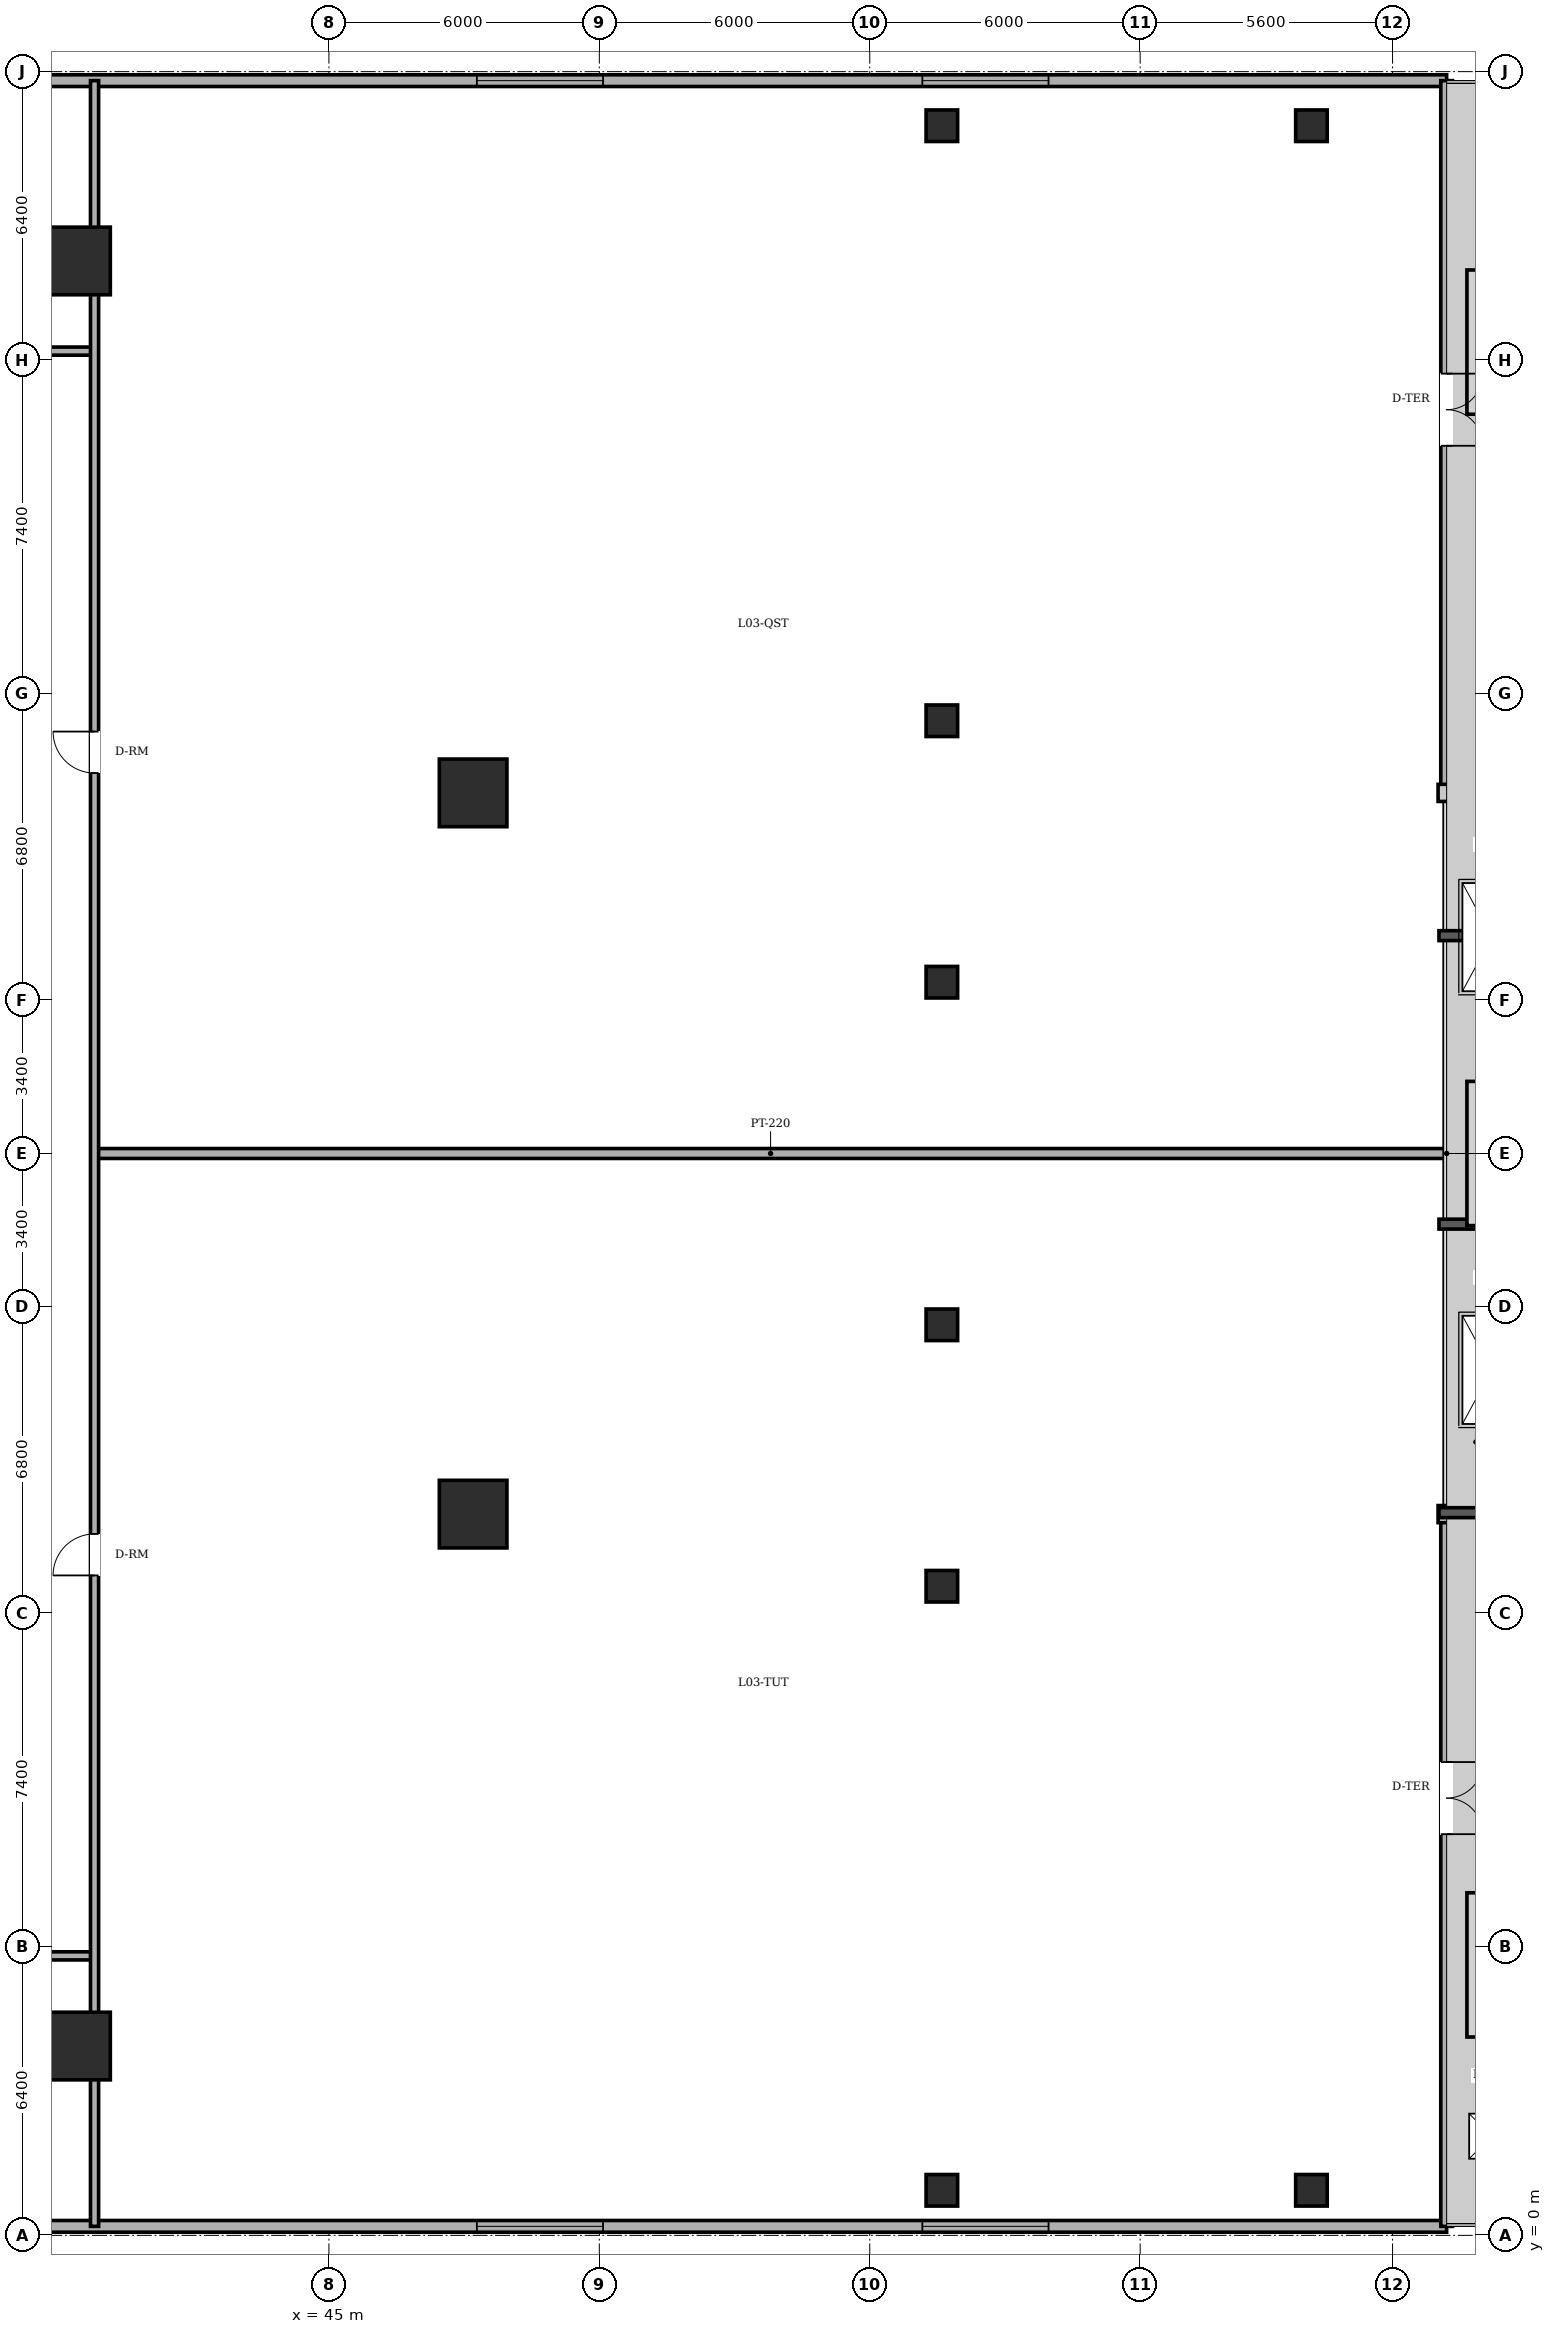
"""IFC4 building model, lengths in metres.
Left out: names, types, materials, properties, quantities, classifications, styles, units other than length and angle.
Written with IfcOpenShell. Run it as: python <this file> out.ifc"""

import sys

from ifc_helpers import new_model, si_unit, direction, frame, frame_2d, origin, origin_2d, place, context, subcontext, project, spatial, rectangle, circle, extrude, element, fill, save


model = new_model("IFC4")
c1 = context("Model", 3, precision=1e-05, world=origin(), true_north=direction((0.0, 1.0)))
c2 = subcontext(c1, "Body", "Model", "MODEL_VIEW")
j1 = project(units=[si_unit("LENGTHUNIT", "METRE"), si_unit("PLANEANGLEUNIT", "RADIAN")], contexts=[c1])
p1 = place(None, origin())
s1 = spatial("IfcSite", under=j1, at=p1, CompositionType="ELEMENT")
p2 = place(p1, origin())
s2 = spatial("IfcBuilding", under=s1, at=p2, CompositionType="ELEMENT")
p3 = place(p2, frame((0.0, 0.0, 10.05)))
s3 = spatial("IfcBuildingStorey", under=s2, at=p3, CompositionType="ELEMENT", Elevation=10.05)
for number, where, z_axis, x_axis in (
    (1, (39.4, 4.2, 0.0), (0.0, 0.0, 1.0), (1.0, 0.0, 0.0)),
    (2, (48.2, 16.0, 0.0), (0.0, 0.0, 1.0), (1.0, 0.0, 0.0)),
    (3, (48.2, 32.0, 0.0), (0.0, 0.0, 1.0), (1.0, 0.0, 0.0)),
    (4, (39.4, 43.8, 0.0), (0.0, 0.0, 1.0), (1.0, 0.0, 0.0)),
):
    element("IfcColumn", number, at=place(p3, frame(where, z_axis=z_axis, x_axis=x_axis)), inside=s3, PredefinedType="COLUMN", context=c2, shape_type="SweptSolid", body=[
        extrude(circle(Radius=0.75, at=origin_2d()), origin(), (0.0, 0.0, 1.0), 4.65),
    ])
for number, where, z_axis, x_axis in (
    (5, (58.6, 1.0, 0.0), (0.0, 0.0, 1.0), (1.0, 0.0, 0.0)),
    (6, (58.6, 46.8, 0.0), (0.0, 0.0, 1.0), (1.0, 0.0, 0.0)),
    (7, (58.6, 20.2, 0.0), (0.0, 0.0, 1.0), (1.0, 0.0, 0.0)),
    (8, (58.6, 27.8, 0.0), (0.0, 0.0, 1.0), (1.0, 0.0, 0.0)),
    (9, (58.6, 14.4, 0.0), (0.0, 0.0, 1.0), (1.0, 0.0, 0.0)),
    (10, (58.6, 33.6, 0.0), (0.0, 0.0, 1.0), (1.0, 0.0, 0.0)),
    (11, (66.8, 1.0, 0.0), (0.0, 0.0, 1.0), (1.0, 0.0, 0.0)),
    (12, (66.8, 46.8, 0.0), (0.0, 0.0, 1.0), (1.0, 0.0, 0.0)),
):
    element("IfcColumn", number, at=place(p3, frame(where, z_axis=z_axis, x_axis=x_axis)), inside=s3, PredefinedType="COLUMN", context=c2, shape_type="SweptSolid", body=[
        extrude(rectangle(XDim=0.7, YDim=0.7, at=origin_2d()), origin(), (0.0, 0.0, 1.0), 4.65),
    ])
p4 = place(p3, frame((69.8, 0.2, 0.0), z_axis=(0.0, 0.0, 1.0), x_axis=(-1.0, 0.0, 0.0)))
e13 = element("IfcWall", 13, at=p4, inside=s3, PredefinedType="SOLIDWALL", context=c2, shape_type="SweptSolid", body=[
    extrude(rectangle(XDim=68.2, YDim=0.26, at=frame_2d((34.1, 0.0))), origin(), (0.0, 0.0, 1.0), 4.43),
])
p5 = place(p4, frame((8.833, 0.0, 0.9)))
e14 = element("IfcOpeningElement", 14, at=p5, cuts=e13, PredefinedType="OPENING", context=c2, shape_type="SweptSolid", body=[
    extrude(rectangle(XDim=2.8, YDim=2.4, at=frame_2d((1.4, 1.2))), frame((0.0, 0.14, 0.0), z_axis=(0.0, -1.0, 0.0), x_axis=(1.0, 0.0, 0.0)), (0.0, 0.0, 1.0), 0.28),
])
p6 = place(p4, frame((18.717, 0.0, 0.9)))
e15 = element("IfcOpeningElement", 15, at=p6, cuts=e13, PredefinedType="OPENING", context=c2, shape_type="SweptSolid", body=[
    extrude(rectangle(XDim=2.8, YDim=2.4, at=frame_2d((1.4, 1.2))), frame((0.0, 0.14, 0.0), z_axis=(0.0, -1.0, 0.0), x_axis=(1.0, 0.0, 0.0)), (0.0, 0.0, 1.0), 0.28),
])
p7 = place(p4, frame((34.733, 0.0, 0.9)))
e16 = element("IfcOpeningElement", 16, at=p7, cuts=e13, PredefinedType="OPENING", context=c2, shape_type="SweptSolid", body=[
    extrude(rectangle(XDim=2.8, YDim=2.4, at=frame_2d((1.4, 1.2))), frame((0.0, 0.14, 0.0), z_axis=(0.0, -1.0, 0.0), x_axis=(1.0, 0.0, 0.0)), (0.0, 0.0, 1.0), 0.28),
])
p8 = place(p4, frame((40.867, 0.0, 0.9)))
e17 = element("IfcOpeningElement", 17, at=p8, cuts=e13, PredefinedType="OPENING", context=c2, shape_type="SweptSolid", body=[
    extrude(rectangle(XDim=2.8, YDim=2.4, at=frame_2d((1.4, 1.2))), frame((0.0, 0.14, 0.0), z_axis=(0.0, -1.0, 0.0), x_axis=(1.0, 0.0, 0.0)), (0.0, 0.0, 1.0), 0.28),
])
p9 = place(p4, frame((53.483, 0.0, 0.9)))
e18 = element("IfcOpeningElement", 18, at=p9, cuts=e13, PredefinedType="OPENING", context=c2, shape_type="SweptSolid", body=[
    extrude(rectangle(XDim=2.8, YDim=2.4, at=frame_2d((1.4, 1.2))), frame((0.0, 0.14, 0.0), z_axis=(0.0, -1.0, 0.0), x_axis=(1.0, 0.0, 0.0)), (0.0, 0.0, 1.0), 0.28),
])
p10 = place(p3, frame((1.6, 47.8, 0.0), z_axis=(0.0, 0.0, 1.0), x_axis=(1.0, 0.0, 0.0)))
e19 = element("IfcWall", 19, at=p10, inside=s3, PredefinedType="SOLIDWALL", context=c2, shape_type="SweptSolid", body=[
    extrude(rectangle(XDim=68.2, YDim=0.26, at=frame_2d((34.1, 0.0))), origin(), (0.0, 0.0, 1.0), 4.43),
])
p11 = place(p10, frame((11.567, 0.0, 0.9)))
e20 = element("IfcOpeningElement", 20, at=p11, cuts=e19, PredefinedType="OPENING", context=c2, shape_type="SweptSolid", body=[
    extrude(rectangle(XDim=2.8, YDim=2.4, at=frame_2d((1.4, 1.2))), frame((0.0, 0.14, 0.0), z_axis=(0.0, -1.0, 0.0), x_axis=(1.0, 0.0, 0.0)), (0.0, 0.0, 1.0), 0.28),
])
p12 = place(p10, frame((24.183, 0.0, 0.9)))
e21 = element("IfcOpeningElement", 21, at=p12, cuts=e19, PredefinedType="OPENING", context=c2, shape_type="SweptSolid", body=[
    extrude(rectangle(XDim=2.8, YDim=2.4, at=frame_2d((1.4, 1.2))), frame((0.0, 0.14, 0.0), z_axis=(0.0, -1.0, 0.0), x_axis=(1.0, 0.0, 0.0)), (0.0, 0.0, 1.0), 0.28),
])
p13 = place(p10, frame((46.683, 0.0, 0.9)))
e22 = element("IfcOpeningElement", 22, at=p13, cuts=e19, PredefinedType="OPENING", context=c2, shape_type="SweptSolid", body=[
    extrude(rectangle(XDim=2.8, YDim=2.4, at=frame_2d((1.4, 1.2))), frame((0.0, 0.14, 0.0), z_axis=(0.0, -1.0, 0.0), x_axis=(1.0, 0.0, 0.0)), (0.0, 0.0, 1.0), 0.28),
])
p14 = place(p10, frame((56.567, 0.0, 0.9)))
e23 = element("IfcOpeningElement", 23, at=p14, cuts=e19, PredefinedType="OPENING", context=c2, shape_type="SweptSolid", body=[
    extrude(rectangle(XDim=2.8, YDim=2.4, at=frame_2d((1.4, 1.2))), frame((0.0, 0.14, 0.0), z_axis=(0.0, -1.0, 0.0), x_axis=(1.0, 0.0, 0.0)), (0.0, 0.0, 1.0), 0.28),
])
p15 = place(p3, frame((69.8, 16.0, 0.0), z_axis=(0.0, 0.0, 1.0), x_axis=(0.0, -1.0, 0.0)))
e24 = element("IfcWall", 24, at=p15, inside=s3, PredefinedType="SOLIDWALL", context=c2, shape_type="SweptSolid", body=[
    extrude(rectangle(XDim=15.8, YDim=0.26, at=frame_2d((7.9, 0.0))), origin(), (0.0, 0.0, 1.0), 4.43),
])
p16 = place(p15, frame((5.5, 0.0, 0.0)))
e25 = element("IfcOpeningElement", 25, at=p16, cuts=e24, PredefinedType="OPENING", context=c2, shape_type="SweptSolid", body=[
    extrude(rectangle(XDim=1.6, YDim=2.3, at=frame_2d((0.8, 1.15))), frame((0.0, 0.14, 0.0), z_axis=(0.0, -1.0, 0.0), x_axis=(1.0, 0.0, 0.0)), (0.0, 0.0, 1.0), 0.28),
])
p17 = place(p3, frame((69.8, 47.8, 0.0), z_axis=(0.0, 0.0, 1.0), x_axis=(0.0, -1.0, 0.0)))
e26 = element("IfcWall", 26, at=p17, inside=s3, PredefinedType="SOLIDWALL", context=c2, shape_type="SweptSolid", body=[
    extrude(rectangle(XDim=15.8, YDim=0.26, at=frame_2d((7.9, 0.0))), origin(), (0.0, 0.0, 1.0), 4.43),
])
p18 = place(p17, frame((6.5, 0.0, 0.0)))
e27 = element("IfcOpeningElement", 27, at=p18, cuts=e26, PredefinedType="OPENING", context=c2, shape_type="SweptSolid", body=[
    extrude(rectangle(XDim=1.6, YDim=2.3, at=frame_2d((0.8, 1.15))), frame((0.0, 0.14, 0.0), z_axis=(0.0, -1.0, 0.0), x_axis=(1.0, 0.0, 0.0)), (0.0, 0.0, 1.0), 0.28),
])
p19 = place(p3, frame((17.89, 6.2, 0.0), z_axis=(0.0, 0.0, 1.0), x_axis=(1.0, 0.0, 0.0)))
e28 = element("IfcWall", 28, at=p19, inside=s3, PredefinedType="PARTITIONING", context=c2, shape_type="SweptSolid", body=[
    extrude(rectangle(XDim=21.91, YDim=0.18, at=frame_2d((10.955, 0.0))), origin(), (0.0, 0.0, 1.0), 4.43),
])
p20 = place(p3, frame((39.8, 24.0, 0.0), z_axis=(0.0, 0.0, 1.0), x_axis=(1.0, 0.0, 0.0)))
e29 = element("IfcWall", 29, at=p20, inside=s3, PredefinedType="PARTITIONING", context=c2, shape_type="SweptSolid", body=[
    extrude(rectangle(XDim=30.0, YDim=0.22, at=frame_2d((15.0, 0.0))), origin(), (0.0, 0.0, 1.0), 4.012),
])
p21 = place(p3, frame((17.89, 41.8, 0.0), z_axis=(0.0, 0.0, 1.0), x_axis=(1.0, 0.0, 0.0)))
e30 = element("IfcWall", 30, at=p21, inside=s3, PredefinedType="PARTITIONING", context=c2, shape_type="SweptSolid", body=[
    extrude(rectangle(XDim=21.91, YDim=0.18, at=frame_2d((10.955, 0.0))), origin(), (0.0, 0.0, 1.0), 4.43),
])
p22 = place(p3, frame((39.8, 0.2, 0.0), z_axis=(0.0, 0.0, 1.0), x_axis=(0.0, 1.0, 0.0)))
e31 = element("IfcWall", 31, at=p22, inside=s3, PredefinedType="PARTITIONING", context=c2, shape_type="SweptSolid", body=[
    extrude(rectangle(XDim=47.6, YDim=0.18, at=frame_2d((23.8, 0.0))), origin(), (0.0, 0.0, 1.0), 4.43),
])
p23 = place(p22, frame((14.44, 0.0, 0.0)))
e32 = element("IfcOpeningElement", 32, at=p23, cuts=e31, PredefinedType="OPENING", context=c2, shape_type="SweptSolid", body=[
    extrude(rectangle(XDim=0.92, YDim=2.1, at=frame_2d((0.46, 1.05))), frame((0.0, 0.1, 0.0), z_axis=(0.0, -1.0, 0.0), x_axis=(1.0, 0.0, 0.0)), (0.0, 0.0, 1.0), 0.2),
])
p24 = place(p22, frame((32.24, 0.0, 0.0)))
e33 = element("IfcOpeningElement", 33, at=p24, cuts=e31, PredefinedType="OPENING", context=c2, shape_type="SweptSolid", body=[
    extrude(rectangle(XDim=0.92, YDim=2.1, at=frame_2d((0.46, 1.05))), frame((0.0, 0.1, 0.0), z_axis=(0.0, -1.0, 0.0), x_axis=(1.0, 0.0, 0.0)), (0.0, 0.0, 1.0), 0.2),
])
p25 = place(p16, origin())
e34 = element("IfcDoor", 34, at=p25, inside=s3, OperationType="DOUBLE_DOOR_SINGLE_SWING", PredefinedType="DOOR", context=c2, shape_type="SweptSolid", body=[
    extrude(rectangle(XDim=1.6, YDim=2.3, at=frame_2d((0.8, 1.15))), frame((0.0, 0.025, 0.0), z_axis=(0.0, -1.0, 0.0), x_axis=(1.0, 0.0, 0.0)), (0.0, 0.0, 1.0), 0.05),
])
fill(e25, e34)
p26 = place(p18, origin())
e35 = element("IfcDoor", 35, at=p26, inside=s3, OperationType="DOUBLE_DOOR_SINGLE_SWING", PredefinedType="DOOR", context=c2, shape_type="SweptSolid", body=[
    extrude(rectangle(XDim=1.6, YDim=2.3, at=frame_2d((0.8, 1.15))), frame((0.0, 0.025, 0.0), z_axis=(0.0, -1.0, 0.0), x_axis=(1.0, 0.0, 0.0)), (0.0, 0.0, 1.0), 0.05),
])
fill(e27, e35)
p27 = place(p13, origin())
e36 = element("IfcWindow", 36, at=p27, inside=s3, PartitioningType="TRIPLE_PANEL_VERTICAL", PredefinedType="WINDOW", context=c2, shape_type="SweptSolid", body=[
    extrude(rectangle(XDim=2.8, YDim=2.4, at=frame_2d((1.4, 1.2))), frame((0.0, 0.03, 0.0), z_axis=(0.0, -1.0, 0.0), x_axis=(1.0, 0.0, 0.0)), (0.0, 0.0, 1.0), 0.06),
])
fill(e22, e36)
p28 = place(p14, origin())
e37 = element("IfcWindow", 37, at=p28, inside=s3, PartitioningType="TRIPLE_PANEL_VERTICAL", PredefinedType="WINDOW", context=c2, shape_type="SweptSolid", body=[
    extrude(rectangle(XDim=2.8, YDim=2.4, at=frame_2d((1.4, 1.2))), frame((0.0, 0.03, 0.0), z_axis=(0.0, -1.0, 0.0), x_axis=(1.0, 0.0, 0.0)), (0.0, 0.0, 1.0), 0.06),
])
fill(e23, e37)
p29 = place(p5, origin())
e38 = element("IfcWindow", 38, at=p29, inside=s3, PartitioningType="TRIPLE_PANEL_VERTICAL", PredefinedType="WINDOW", context=c2, shape_type="SweptSolid", body=[
    extrude(rectangle(XDim=2.8, YDim=2.4, at=frame_2d((1.4, 1.2))), frame((0.0, 0.03, 0.0), z_axis=(0.0, -1.0, 0.0), x_axis=(1.0, 0.0, 0.0)), (0.0, 0.0, 1.0), 0.06),
])
fill(e14, e38)
p30 = place(p6, origin())
e39 = element("IfcWindow", 39, at=p30, inside=s3, PartitioningType="TRIPLE_PANEL_VERTICAL", PredefinedType="WINDOW", context=c2, shape_type="SweptSolid", body=[
    extrude(rectangle(XDim=2.8, YDim=2.4, at=frame_2d((1.4, 1.2))), frame((0.0, 0.03, 0.0), z_axis=(0.0, -1.0, 0.0), x_axis=(1.0, 0.0, 0.0)), (0.0, 0.0, 1.0), 0.06),
])
fill(e15, e39)
p31 = place(p3, frame((0.0, 0.0, -0.21)))
p32 = place(p31, frame((70.8, 19.2, 0.0)))
p33 = place(p32, frame((0.0, 0.0, 0.16)))
e40 = element("IfcWindow", 40, at=p33, inside=s3, PartitioningType="SINGLE_PANEL", PredefinedType="SKYLIGHT", context=c2, shape_type="SweptSolid", body=[
    extrude(rectangle(XDim=1.3, YDim=2.4, at=origin_2d()), origin(), (0.0, 0.0, 1.0), 0.05),
])
p34 = place(p31, frame((70.8, 28.8, 0.0)))
p35 = place(p34, frame((0.0, 0.0, 0.16)))
e41 = element("IfcWindow", 41, at=p35, inside=s3, PartitioningType="SINGLE_PANEL", PredefinedType="SKYLIGHT", context=c2, shape_type="SweptSolid", body=[
    extrude(rectangle(XDim=1.3, YDim=2.4, at=origin_2d()), origin(), (0.0, 0.0, 1.0), 0.05),
])
p36 = place(p31, frame((70.8, 2.2, 0.0)))
p37 = place(p36, frame((0.0, 0.0, 0.16)))
e42 = element("IfcDoor", 42, at=p37, inside=s3, OperationType="SINGLE_SWING_LEFT", PredefinedType="TRAPDOOR", context=c2, shape_type="SweptSolid", body=[
    extrude(rectangle(XDim=1.0, YDim=1.0, at=origin_2d()), origin(), (0.0, 0.0, 1.0), 0.05),
])
p38 = place(p23, origin())
e43 = element("IfcDoor", 43, at=p38, inside=s3, OperationType="SINGLE_SWING_LEFT", PredefinedType="DOOR", context=c2, shape_type="SweptSolid", body=[
    extrude(rectangle(XDim=0.92, YDim=2.1, at=frame_2d((0.46, 1.05))), frame((0.0, 0.025, 0.0), z_axis=(0.0, -1.0, 0.0), x_axis=(1.0, 0.0, 0.0)), (0.0, 0.0, 1.0), 0.05),
])
fill(e32, e43)
p39 = place(p24, origin())
e44 = element("IfcDoor", 44, at=p39, inside=s3, OperationType="SINGLE_SWING_RIGHT", PredefinedType="DOOR", context=c2, shape_type="SweptSolid", body=[
    extrude(rectangle(XDim=0.92, YDim=2.1, at=frame_2d((0.46, 1.05))), frame((0.0, 0.025, 0.0), z_axis=(0.0, -1.0, 0.0), x_axis=(1.0, 0.0, 0.0)), (0.0, 0.0, 1.0), 0.05),
])
fill(e33, e44)
save(model, sys.argv[1])
